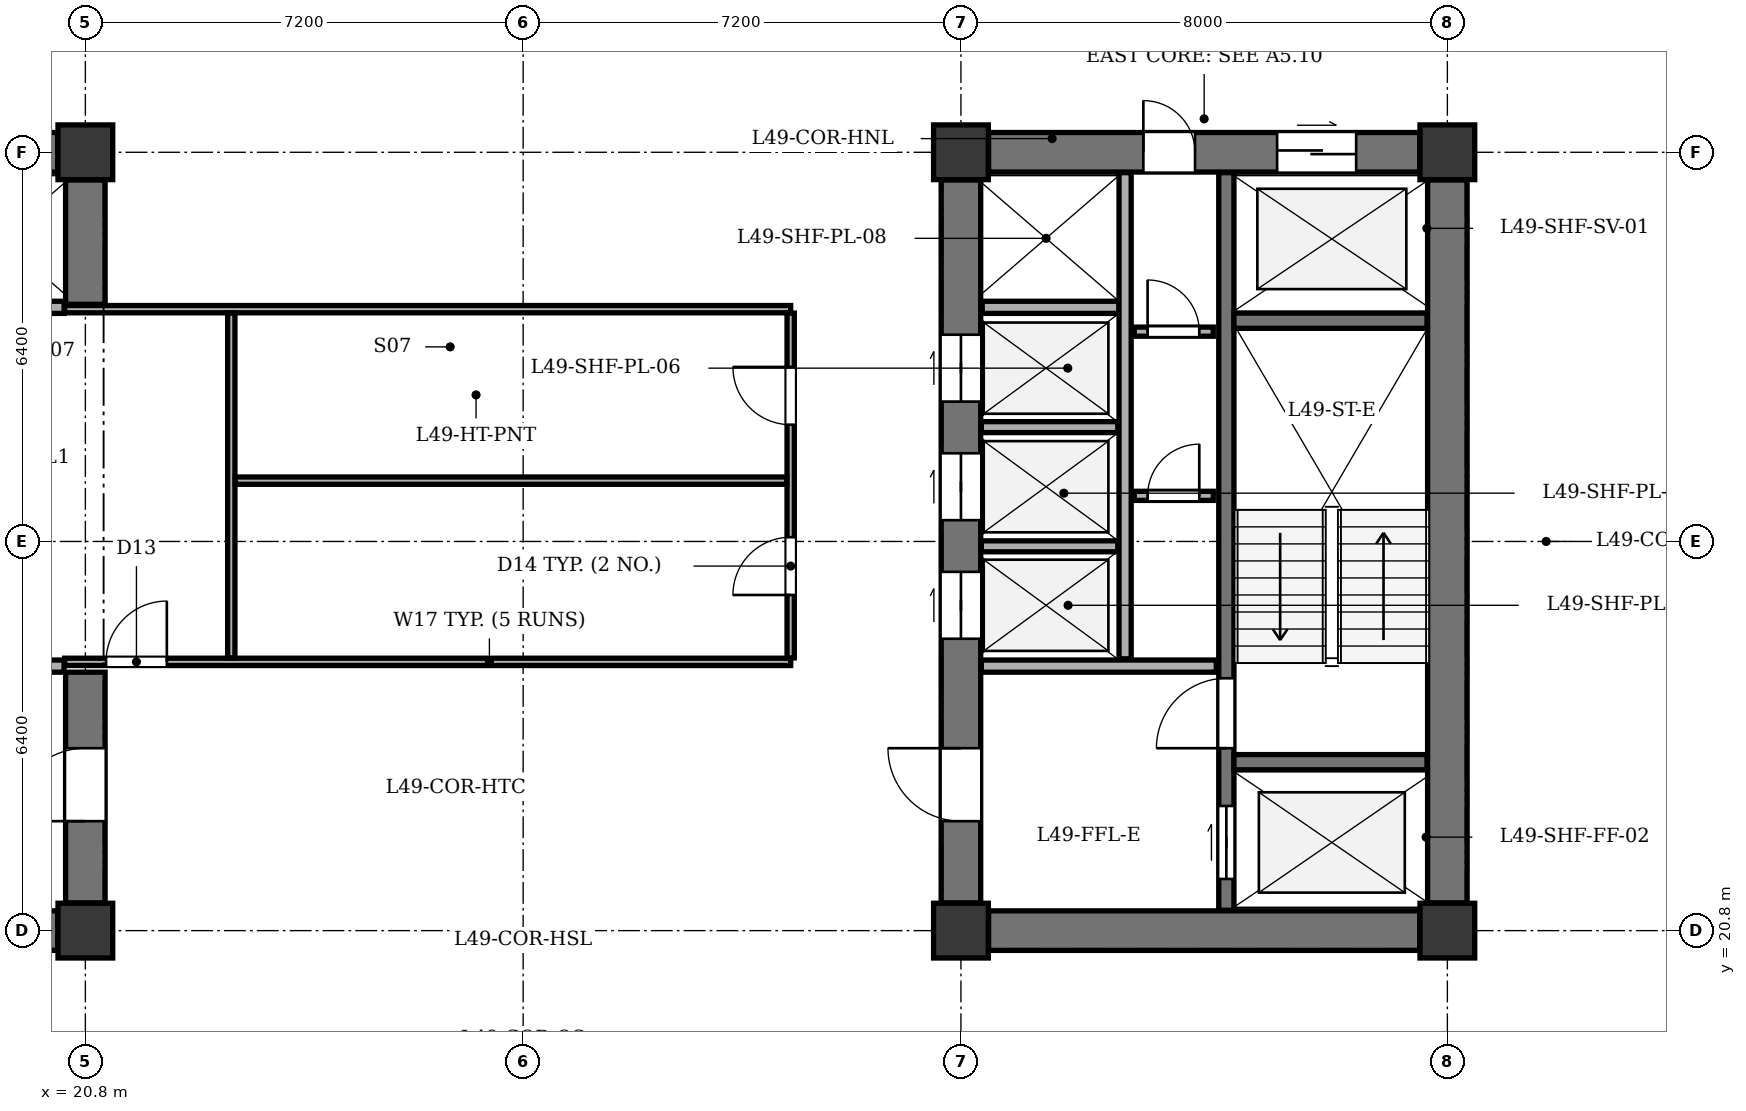
"""IFC4 building model, lengths in metres.
Left out: names, types, materials, properties, quantities, classifications, styles, units other than length and angle.
Written with IfcOpenShell. Run it as: python <this file> out.ifc"""

import sys

from ifc_helpers import new_model, si_unit, direction, frame, frame_2d, origin, origin_2d, place, context, subcontext, project, spatial, rectangle, extrude, element, fill, save


model = new_model("IFC4")
c1 = context("Model", 3, precision=1e-05, world=origin(), true_north=direction((0.0, 1.0)))
c2 = subcontext(c1, "Body", "Model", "MODEL_VIEW")
j1 = project(units=[si_unit("LENGTHUNIT", "METRE"), si_unit("PLANEANGLEUNIT", "RADIAN")], contexts=[c1])
p1 = place(None, origin())
s1 = spatial("IfcSite", under=j1, at=p1, CompositionType="ELEMENT")
p2 = place(p1, origin())
s2 = spatial("IfcBuilding", under=s1, at=p2, CompositionType="ELEMENT")
p3 = place(p2, frame((0.0, 0.0, 190.3)))
s3 = spatial("IfcBuildingStorey", under=s2, at=p3, CompositionType="ELEMENT", Elevation=190.3)
for number, where, z_axis, x_axis in (
    (1, (20.8, 20.8, 0.0), (0.0, 0.0, 1.0), (1.0, 0.0, 0.0)),
    (2, (20.8, 33.6, 0.0), (0.0, 0.0, 1.0), (1.0, 0.0, 0.0)),
    (3, (35.2, 20.8, 0.0), (0.0, 0.0, 1.0), (1.0, 0.0, 0.0)),
    (4, (43.2, 20.8, 0.0), (0.0, 0.0, 1.0), (1.0, 0.0, 0.0)),
    (5, (35.2, 33.6, 0.0), (0.0, 0.0, 1.0), (1.0, 0.0, 0.0)),
    (6, (43.2, 33.6, 0.0), (0.0, 0.0, 1.0), (1.0, 0.0, 0.0)),
):
    element("IfcColumn", number, at=place(p3, frame(where, z_axis=z_axis, x_axis=x_axis)), inside=s3, PredefinedType="COLUMN", context=c2, shape_type="SweptSolid", body=[
        extrude(rectangle(XDim=0.9, YDim=0.9, at=origin_2d()), origin(), (0.0, 0.0, 1.0), 3.5),
    ])
p4 = place(p3, frame((13.255, 20.8, 0.0), z_axis=(0.0, 0.0, 1.0), x_axis=(1.0, 0.0, 0.0)))
e7 = element("IfcWall", 7, at=p4, inside=s3, PredefinedType="SHEAR", context=c2, shape_type="SweptSolid", body=[
    extrude(rectangle(XDim=7.09, YDim=0.65, at=frame_2d((3.545, 0.0))), origin(), (0.0, 0.0, 1.0), 3.2),
])
p5 = place(p3, frame((13.255, 33.6, 0.0), z_axis=(0.0, 0.0, 1.0), x_axis=(1.0, 0.0, 0.0)))
e8 = element("IfcWall", 8, at=p5, inside=s3, PredefinedType="SHEAR", context=c2, shape_type="SweptSolid", body=[
    extrude(rectangle(XDim=7.09, YDim=0.65, at=frame_2d((3.545, 0.0))), origin(), (0.0, 0.0, 1.0), 3.2),
])
p6 = place(p5, frame((0.445, 0.0, 0.0)))
e9 = element("IfcOpeningElement", 9, at=p6, cuts=e8, PredefinedType="OPENING", context=c2, shape_type="SweptSolid", body=[
    extrude(rectangle(XDim=0.85, YDim=2.02, at=frame_2d((0.425, 1.01))), frame((0.0, 0.335, 0.0), z_axis=(0.0, -1.0, 0.0), x_axis=(1.0, 0.0, 0.0)), (0.0, 0.0, 1.0), 0.67),
])
p7 = place(p5, frame((1.745, 0.0, 0.0)))
e10 = element("IfcOpeningElement", 10, at=p7, cuts=e8, PredefinedType="OPENING", context=c2, shape_type="SweptSolid", body=[
    extrude(rectangle(XDim=0.85, YDim=2.02, at=frame_2d((0.425, 1.01))), frame((0.0, 0.335, 0.0), z_axis=(0.0, -1.0, 0.0), x_axis=(1.0, 0.0, 0.0)), (0.0, 0.0, 1.0), 0.67),
])
p8 = place(p3, frame((20.8, 21.255, 0.0), z_axis=(0.0, 0.0, 1.0), x_axis=(0.0, 1.0, 0.0)))
e11 = element("IfcWall", 11, at=p8, inside=s3, PredefinedType="SHEAR", context=c2, shape_type="SweptSolid", body=[
    extrude(rectangle(XDim=3.795, YDim=0.65, at=frame_2d((1.897, 0.0))), origin(), (0.0, 0.0, 1.0), 3.2),
])
p9 = place(p8, frame((1.345, 0.0, 0.0)))
e12 = element("IfcOpeningElement", 12, at=p9, cuts=e11, PredefinedType="OPENING", context=c2, shape_type="SweptSolid", body=[
    extrude(rectangle(XDim=1.2, YDim=2.15, at=frame_2d((0.6, 1.075))), frame((0.0, 0.335, 0.0), z_axis=(0.0, -1.0, 0.0), x_axis=(1.0, 0.0, 0.0)), (0.0, 0.0, 1.0), 0.67),
])
p10 = place(p3, frame((20.8, 31.1, 0.0), z_axis=(0.0, 0.0, 1.0), x_axis=(0.0, 1.0, 0.0)))
e13 = element("IfcWall", 13, at=p10, inside=s3, PredefinedType="SHEAR", context=c2, shape_type="SweptSolid", body=[
    extrude(rectangle(XDim=2.045, YDim=0.65, at=frame_2d((1.022, 0.0))), origin(), (0.0, 0.0, 1.0), 3.2),
])
for number, where, z_axis, x_axis in (
    (14, (16.6, 25.15, 0.0), (0.0, 0.0, 1.0), (1.0, 0.0, 0.0)),
    (15, (16.6, 31.05, 0.0), (0.0, 0.0, 1.0), (1.0, 0.0, 0.0)),
):
    element("IfcWall", number, at=place(p3, frame(where, z_axis=z_axis, x_axis=x_axis)), inside=s3, PredefinedType="SOLIDWALL", context=c2, shape_type="SweptSolid", body=[
        extrude(rectangle(XDim=3.85, YDim=0.2, at=frame_2d((1.925, 0.0))), origin(), (0.0, 0.0, 1.0), 3.2),
    ])
p11 = place(p3, frame((43.2, 21.255, 0.0), z_axis=(0.0, 0.0, 1.0), x_axis=(0.0, 1.0, 0.0)))
e16 = element("IfcWall", 16, at=p11, inside=s3, PredefinedType="SHEAR", context=c2, shape_type="SweptSolid", body=[
    extrude(rectangle(XDim=11.89, YDim=0.65, at=frame_2d((5.945, 0.0))), origin(), (0.0, 0.0, 1.0), 3.2),
])
p12 = place(p3, frame((35.655, 20.8, 0.0), z_axis=(0.0, 0.0, 1.0), x_axis=(1.0, 0.0, 0.0)))
e17 = element("IfcWall", 17, at=p12, inside=s3, PredefinedType="SHEAR", context=c2, shape_type="SweptSolid", body=[
    extrude(rectangle(XDim=7.09, YDim=0.65, at=frame_2d((3.545, 0.0))), origin(), (0.0, 0.0, 1.0), 3.2),
])
p13 = place(p3, frame((35.655, 33.6, 0.0), z_axis=(0.0, 0.0, 1.0), x_axis=(1.0, 0.0, 0.0)))
e18 = element("IfcWall", 18, at=p13, inside=s3, PredefinedType="SHEAR", context=c2, shape_type="SweptSolid", body=[
    extrude(rectangle(XDim=7.09, YDim=0.65, at=frame_2d((3.545, 0.0))), origin(), (0.0, 0.0, 1.0), 3.2),
])
p14 = place(p13, frame((4.745, 0.0, 0.0)))
e19 = element("IfcOpeningElement", 19, at=p14, cuts=e18, PredefinedType="OPENING", context=c2, shape_type="SweptSolid", body=[
    extrude(rectangle(XDim=1.3, YDim=2.15, at=frame_2d((0.65, 1.075))), frame((0.0, 0.335, 0.0), z_axis=(0.0, -1.0, 0.0), x_axis=(1.0, 0.0, 0.0)), (0.0, 0.0, 1.0), 0.67),
])
p15 = place(p13, frame((2.545, 0.0, 0.0)))
e20 = element("IfcOpeningElement", 20, at=p15, cuts=e18, PredefinedType="OPENING", context=c2, shape_type="SweptSolid", body=[
    extrude(rectangle(XDim=0.85, YDim=2.02, at=frame_2d((0.425, 1.01))), frame((0.0, 0.335, 0.0), z_axis=(0.0, -1.0, 0.0), x_axis=(1.0, 0.0, 0.0)), (0.0, 0.0, 1.0), 0.67),
])
p16 = place(p3, frame((35.2, 21.255, 0.0), z_axis=(0.0, 0.0, 1.0), x_axis=(0.0, 1.0, 0.0)))
e21 = element("IfcWall", 21, at=p16, inside=s3, PredefinedType="SHEAR", context=c2, shape_type="SweptSolid", body=[
    extrude(rectangle(XDim=11.89, YDim=0.65, at=frame_2d((5.945, 0.0))), origin(), (0.0, 0.0, 1.0), 3.2),
])
p17 = place(p16, frame((1.345, 0.0, 0.0)))
e22 = element("IfcOpeningElement", 22, at=p17, cuts=e21, PredefinedType="OPENING", context=c2, shape_type="SweptSolid", body=[
    extrude(rectangle(XDim=1.2, YDim=2.15, at=frame_2d((0.6, 1.075))), frame((0.0, 0.335, 0.0), z_axis=(0.0, -1.0, 0.0), x_axis=(1.0, 0.0, 0.0)), (0.0, 0.0, 1.0), 0.67),
])
p18 = place(p16, frame((4.345, 0.0, 0.0)))
e23 = element("IfcOpeningElement", 23, at=p18, cuts=e21, PredefinedType="OPENING", context=c2, shape_type="SweptSolid", body=[
    extrude(rectangle(XDim=1.1, YDim=2.1, at=frame_2d((0.55, 1.05))), frame((0.0, 0.335, 0.0), z_axis=(0.0, -1.0, 0.0), x_axis=(1.0, 0.0, 0.0)), (0.0, 0.0, 1.0), 0.67),
])
p19 = place(p16, frame((6.295, 0.0, 0.0)))
e24 = element("IfcOpeningElement", 24, at=p19, cuts=e21, PredefinedType="OPENING", context=c2, shape_type="SweptSolid", body=[
    extrude(rectangle(XDim=1.1, YDim=2.1, at=frame_2d((0.55, 1.05))), frame((0.0, 0.335, 0.0), z_axis=(0.0, -1.0, 0.0), x_axis=(1.0, 0.0, 0.0)), (0.0, 0.0, 1.0), 0.67),
])
p20 = place(p16, frame((8.245, 0.0, 0.0)))
e25 = element("IfcOpeningElement", 25, at=p20, cuts=e21, PredefinedType="OPENING", context=c2, shape_type="SweptSolid", body=[
    extrude(rectangle(XDim=1.1, YDim=2.1, at=frame_2d((0.55, 1.05))), frame((0.0, 0.335, 0.0), z_axis=(0.0, -1.0, 0.0), x_axis=(1.0, 0.0, 0.0)), (0.0, 0.0, 1.0), 0.67),
])
p21 = place(p3, frame((39.565, 21.135, 0.0), z_axis=(0.0, 0.0, 1.0), x_axis=(0.0, 1.0, 0.0)))
e26 = element("IfcWall", 26, at=p21, inside=s3, PredefinedType="SHEAR", context=c2, shape_type="SweptSolid", body=[
    extrude(rectangle(XDim=12.13, YDim=0.25, at=frame_2d((6.065, 0.0))), origin(), (0.0, 0.0, 1.0), 3.2),
])
p22 = place(p21, frame((0.515, 0.0, 0.0)))
e27 = element("IfcOpeningElement", 27, at=p22, cuts=e26, PredefinedType="OPENING", context=c2, shape_type="SweptSolid", body=[
    extrude(rectangle(XDim=1.2, YDim=2.15, at=frame_2d((0.6, 1.075))), frame((0.0, 0.135, 0.0), z_axis=(0.0, -1.0, 0.0), x_axis=(1.0, 0.0, 0.0)), (0.0, 0.0, 1.0), 0.27),
])
p23 = place(p21, frame((2.665, 0.0, 0.0)))
e28 = element("IfcOpeningElement", 28, at=p23, cuts=e26, PredefinedType="OPENING", context=c2, shape_type="SweptSolid", body=[
    extrude(rectangle(XDim=1.15, YDim=2.15, at=frame_2d((0.575, 1.075))), frame((0.0, 0.135, 0.0), z_axis=(0.0, -1.0, 0.0), x_axis=(1.0, 0.0, 0.0)), (0.0, 0.0, 1.0), 0.27),
])
for number, where, z_axis, x_axis in (
    (29, (39.69, 23.57, 0.0), (0.0, 0.0, 1.0), (1.0, 0.0, 0.0)),
    (30, (39.69, 30.83, 0.0), (0.0, 0.0, 1.0), (1.0, 0.0, 0.0)),
):
    element("IfcWall", number, at=place(p3, frame(where, z_axis=z_axis, x_axis=x_axis)), inside=s3, PredefinedType="SHEAR", context=c2, shape_type="SweptSolid", body=[
        extrude(rectangle(XDim=3.175, YDim=0.25, at=frame_2d((1.587, 0.0))), origin(), (0.0, 0.0, 1.0), 3.2),
    ])
p24 = place(p3, frame((35.535, 25.15, 0.0), z_axis=(0.0, 0.0, 1.0), x_axis=(1.0, 0.0, 0.0)))
e31 = element("IfcWall", 31, at=p24, inside=s3, PredefinedType="SOLIDWALL", context=c2, shape_type="SweptSolid", body=[
    extrude(rectangle(XDim=3.865, YDim=0.2, at=frame_2d((1.933, 0.0))), origin(), (0.0, 0.0, 1.0), 3.2),
])
p25 = place(p3, frame((35.55, 31.05, 0.0), z_axis=(0.0, 0.0, 1.0), x_axis=(1.0, 0.0, 0.0)))
e32 = element("IfcWall", 32, at=p25, inside=s3, PredefinedType="SOLIDWALL", context=c2, shape_type="SweptSolid", body=[
    extrude(rectangle(XDim=2.25, YDim=0.2, at=frame_2d((1.125, 0.0))), origin(), (0.0, 0.0, 1.0), 3.2),
])
p26 = place(p3, frame((37.9, 25.27, 0.0), z_axis=(0.0, 0.0, 1.0), x_axis=(0.0, 1.0, 0.0)))
e33 = element("IfcWall", 33, at=p26, inside=s3, PredefinedType="SOLIDWALL", context=c2, shape_type="SweptSolid", body=[
    extrude(rectangle(XDim=7.995, YDim=0.2, at=frame_2d((3.998, 0.0))), origin(), (0.0, 0.0, 1.0), 3.2),
])
for number, where, z_axis, x_axis in (
    (34, (35.535, 27.12, 0.0), (0.0, 0.0, 1.0), (1.0, 0.0, 0.0)),
    (35, (35.535, 29.08, 0.0), (0.0, 0.0, 1.0), (1.0, 0.0, 0.0)),
):
    element("IfcWall", number, at=place(p3, frame(where, z_axis=z_axis, x_axis=x_axis)), inside=s3, PredefinedType="PARTITIONING", context=c2, shape_type="SweptSolid", body=[
        extrude(rectangle(XDim=2.245, YDim=0.18, at=frame_2d((1.123, 0.0))), origin(), (0.0, 0.0, 1.0), 3.2),
    ])
p27 = place(p3, frame((38.05, 27.95, 0.0), z_axis=(0.0, 0.0, 1.0), x_axis=(1.0, 0.0, 0.0)))
e36 = element("IfcWall", 36, at=p27, inside=s3, PredefinedType="PARTITIONING", context=c2, shape_type="SweptSolid", body=[
    extrude(rectangle(XDim=1.3, YDim=0.15, at=frame_2d((0.65, 0.0))), origin(), (0.0, 0.0, 1.0), 3.2),
])
p28 = place(p27, frame((0.22, 0.0, 0.0)))
e37 = element("IfcOpeningElement", 37, at=p28, cuts=e36, PredefinedType="OPENING", context=c2, shape_type="SweptSolid", body=[
    extrude(rectangle(XDim=0.85, YDim=2.02, at=frame_2d((0.425, 1.01))), frame((0.0, 0.085, 0.0), z_axis=(0.0, -1.0, 0.0), x_axis=(1.0, 0.0, 0.0)), (0.0, 0.0, 1.0), 0.17),
])
p29 = place(p3, frame((38.05, 30.65, 0.0), z_axis=(0.0, 0.0, 1.0), x_axis=(1.0, 0.0, 0.0)))
e38 = element("IfcWall", 38, at=p29, inside=s3, PredefinedType="PARTITIONING", context=c2, shape_type="SweptSolid", body=[
    extrude(rectangle(XDim=1.3, YDim=0.15, at=frame_2d((0.65, 0.0))), origin(), (0.0, 0.0, 1.0), 3.2),
])
p30 = place(p29, frame((0.22, 0.0, 0.0)))
e39 = element("IfcOpeningElement", 39, at=p30, cuts=e38, PredefinedType="OPENING", context=c2, shape_type="SweptSolid", body=[
    extrude(rectangle(XDim=0.85, YDim=2.02, at=frame_2d((0.425, 1.01))), frame((0.0, 0.085, 0.0), z_axis=(0.0, -1.0, 0.0), x_axis=(1.0, 0.0, 0.0)), (0.0, 0.0, 1.0), 0.17),
])
p31 = place(p3, frame((20.46, 25.22, 0.0), z_axis=(0.0, 0.0, 1.0), x_axis=(1.0, 0.0, 0.0)))
e40 = element("IfcWall", 40, at=p31, inside=s3, PredefinedType="PARTITIONING", context=c2, shape_type="SweptSolid", body=[
    extrude(rectangle(XDim=11.94, YDim=0.12, at=frame_2d((5.97, 0.0))), origin(), (0.0, 0.0, 1.0), 3.2),
])
p32 = place(p31, frame((0.68, 0.0, 0.0)))
e41 = element("IfcOpeningElement", 41, at=p32, cuts=e40, PredefinedType="OPENING", context=c2, shape_type="SweptSolid", body=[
    extrude(rectangle(XDim=1.0, YDim=2.1, at=frame_2d((0.5, 1.05))), frame((0.0, 0.07, 0.0), z_axis=(0.0, -1.0, 0.0), x_axis=(1.0, 0.0, 0.0)), (0.0, 0.0, 1.0), 0.14),
])
p33 = place(p3, frame((20.46, 31.02, 0.0), z_axis=(0.0, 0.0, 1.0), x_axis=(1.0, 0.0, 0.0)))
e42 = element("IfcWall", 42, at=p33, inside=s3, PredefinedType="PARTITIONING", context=c2, shape_type="SweptSolid", body=[
    extrude(rectangle(XDim=11.94, YDim=0.12, at=frame_2d((5.97, 0.0))), origin(), (0.0, 0.0, 1.0), 3.2),
])
p34 = place(p3, frame((32.4, 25.285, 0.0), z_axis=(0.0, 0.0, 1.0), x_axis=(0.0, 1.0, 0.0)))
e43 = element("IfcWall", 43, at=p34, inside=s3, PredefinedType="PARTITIONING", context=c2, shape_type="SweptSolid", body=[
    extrude(rectangle(XDim=5.67, YDim=0.12, at=frame_2d((2.835, 0.0))), origin(), (0.0, 0.0, 1.0), 3.2),
])
p35 = place(p34, frame((1.035, 0.0, 0.0)))
e44 = element("IfcOpeningElement", 44, at=p35, cuts=e43, PredefinedType="OPENING", context=c2, shape_type="SweptSolid", body=[
    extrude(rectangle(XDim=0.95, YDim=2.1, at=frame_2d((0.475, 1.05))), frame((0.0, 0.07, 0.0), z_axis=(0.0, -1.0, 0.0), x_axis=(1.0, 0.0, 0.0)), (0.0, 0.0, 1.0), 0.14),
])
p36 = place(p34, frame((3.835, 0.0, 0.0)))
e45 = element("IfcOpeningElement", 45, at=p36, cuts=e43, PredefinedType="OPENING", context=c2, shape_type="SweptSolid", body=[
    extrude(rectangle(XDim=0.95, YDim=2.1, at=frame_2d((0.475, 1.05))), frame((0.0, 0.07, 0.0), z_axis=(0.0, -1.0, 0.0), x_axis=(1.0, 0.0, 0.0)), (0.0, 0.0, 1.0), 0.14),
])
p37 = place(p3, frame((23.2, 25.285, 0.0), z_axis=(0.0, 0.0, 1.0), x_axis=(0.0, 1.0, 0.0)))
e46 = element("IfcWall", 46, at=p37, inside=s3, PredefinedType="PARTITIONING", context=c2, shape_type="SweptSolid", body=[
    extrude(rectangle(XDim=5.67, YDim=0.12, at=frame_2d((2.835, 0.0))), origin(), (0.0, 0.0, 1.0), 3.2),
])
p38 = place(p3, frame((23.265, 28.2, 0.0), z_axis=(0.0, 0.0, 1.0), x_axis=(1.0, 0.0, 0.0)))
e47 = element("IfcWall", 47, at=p38, inside=s3, PredefinedType="PARTITIONING", context=c2, shape_type="SweptSolid", body=[
    extrude(rectangle(XDim=9.07, YDim=0.12, at=frame_2d((4.535, 0.0))), origin(), (0.0, 0.0, 1.0), 3.2),
])
p39 = place(p9, origin())
e48 = element("IfcDoor", 48, at=p39, inside=s3, OperationType="SINGLE_SWING_LEFT", PredefinedType="DOOR", context=c2, shape_type="SweptSolid", body=[
    extrude(rectangle(XDim=1.2, YDim=2.15, at=frame_2d((0.6, 1.075))), frame((0.0, 0.025, 0.0), z_axis=(0.0, -1.0, 0.0), x_axis=(1.0, 0.0, 0.0)), (0.0, 0.0, 1.0), 0.05),
])
fill(e12, e48)
p40 = place(p14, origin())
e49 = element("IfcDoor", 49, at=p40, inside=s3, OperationType="DOUBLE_DOOR_SLIDING", PredefinedType="DOOR", context=c2, shape_type="SweptSolid", body=[
    extrude(rectangle(XDim=1.3, YDim=2.15, at=frame_2d((0.65, 1.075))), frame((0.0, 0.025, 0.0), z_axis=(0.0, -1.0, 0.0), x_axis=(1.0, 0.0, 0.0)), (0.0, 0.0, 1.0), 0.05),
])
fill(e19, e49)
p41 = place(p15, origin())
e50 = element("IfcDoor", 50, at=p41, inside=s3, OperationType="SINGLE_SWING_LEFT", PredefinedType="DOOR", context=c2, shape_type="SweptSolid", body=[
    extrude(rectangle(XDim=0.85, YDim=2.02, at=frame_2d((0.425, 1.01))), frame((0.0, 0.025, 0.0), z_axis=(0.0, -1.0, 0.0), x_axis=(1.0, 0.0, 0.0)), (0.0, 0.0, 1.0), 0.05),
])
fill(e20, e50)
p42 = place(p17, origin())
e51 = element("IfcDoor", 51, at=p42, inside=s3, OperationType="SINGLE_SWING_RIGHT", PredefinedType="DOOR", context=c2, shape_type="SweptSolid", body=[
    extrude(rectangle(XDim=1.2, YDim=2.15, at=frame_2d((0.6, 1.075))), frame((0.0, 0.025, 0.0), z_axis=(0.0, -1.0, 0.0), x_axis=(1.0, 0.0, 0.0)), (0.0, 0.0, 1.0), 0.05),
])
fill(e22, e51)
p43 = place(p18, origin())
e52 = element("IfcDoor", 52, at=p43, inside=s3, OperationType="DOUBLE_DOOR_SLIDING", PredefinedType="DOOR", context=c2, shape_type="SweptSolid", body=[
    extrude(rectangle(XDim=1.1, YDim=2.1, at=frame_2d((0.55, 1.05))), frame((0.0, 0.025, 0.0), z_axis=(0.0, -1.0, 0.0), x_axis=(1.0, 0.0, 0.0)), (0.0, 0.0, 1.0), 0.05),
])
fill(e23, e52)
p44 = place(p19, origin())
e53 = element("IfcDoor", 53, at=p44, inside=s3, OperationType="DOUBLE_DOOR_SLIDING", PredefinedType="DOOR", context=c2, shape_type="SweptSolid", body=[
    extrude(rectangle(XDim=1.1, YDim=2.1, at=frame_2d((0.55, 1.05))), frame((0.0, 0.025, 0.0), z_axis=(0.0, -1.0, 0.0), x_axis=(1.0, 0.0, 0.0)), (0.0, 0.0, 1.0), 0.05),
])
fill(e24, e53)
p45 = place(p20, origin())
e54 = element("IfcDoor", 54, at=p45, inside=s3, OperationType="DOUBLE_DOOR_SLIDING", PredefinedType="DOOR", context=c2, shape_type="SweptSolid", body=[
    extrude(rectangle(XDim=1.1, YDim=2.1, at=frame_2d((0.55, 1.05))), frame((0.0, 0.025, 0.0), z_axis=(0.0, -1.0, 0.0), x_axis=(1.0, 0.0, 0.0)), (0.0, 0.0, 1.0), 0.05),
])
fill(e25, e54)
p46 = place(p22, origin())
e55 = element("IfcDoor", 55, at=p46, inside=s3, OperationType="DOUBLE_DOOR_SLIDING", PredefinedType="DOOR", context=c2, shape_type="SweptSolid", body=[
    extrude(rectangle(XDim=1.2, YDim=2.15, at=frame_2d((0.6, 1.075))), frame((0.0, 0.025, 0.0), z_axis=(0.0, -1.0, 0.0), x_axis=(1.0, 0.0, 0.0)), (0.0, 0.0, 1.0), 0.05),
])
fill(e27, e55)
p47 = place(p23, origin())
e56 = element("IfcDoor", 56, at=p47, inside=s3, OperationType="SINGLE_SWING_LEFT", PredefinedType="DOOR", context=c2, shape_type="SweptSolid", body=[
    extrude(rectangle(XDim=1.15, YDim=2.15, at=frame_2d((0.575, 1.075))), frame((0.0, 0.025, 0.0), z_axis=(0.0, -1.0, 0.0), x_axis=(1.0, 0.0, 0.0)), (0.0, 0.0, 1.0), 0.05),
])
fill(e28, e56)
p48 = place(p28, origin())
e57 = element("IfcDoor", 57, at=p48, inside=s3, OperationType="SINGLE_SWING_RIGHT", PredefinedType="DOOR", context=c2, shape_type="SweptSolid", body=[
    extrude(rectangle(XDim=0.85, YDim=2.02, at=frame_2d((0.425, 1.01))), frame((0.0, 0.025, 0.0), z_axis=(0.0, -1.0, 0.0), x_axis=(1.0, 0.0, 0.0)), (0.0, 0.0, 1.0), 0.05),
])
fill(e37, e57)
p49 = place(p30, origin())
e58 = element("IfcDoor", 58, at=p49, inside=s3, OperationType="SINGLE_SWING_LEFT", PredefinedType="DOOR", context=c2, shape_type="SweptSolid", body=[
    extrude(rectangle(XDim=0.85, YDim=2.02, at=frame_2d((0.425, 1.01))), frame((0.0, 0.025, 0.0), z_axis=(0.0, -1.0, 0.0), x_axis=(1.0, 0.0, 0.0)), (0.0, 0.0, 1.0), 0.05),
])
fill(e39, e58)
p50 = place(p32, origin())
e59 = element("IfcDoor", 59, at=p50, inside=s3, OperationType="SINGLE_SWING_RIGHT", PredefinedType="DOOR", context=c2, shape_type="SweptSolid", body=[
    extrude(rectangle(XDim=1.0, YDim=2.1, at=frame_2d((0.5, 1.05))), frame((0.0, 0.025, 0.0), z_axis=(0.0, -1.0, 0.0), x_axis=(1.0, 0.0, 0.0)), (0.0, 0.0, 1.0), 0.05),
])
fill(e41, e59)
p51 = place(p35, origin())
e60 = element("IfcDoor", 60, at=p51, inside=s3, OperationType="SINGLE_SWING_LEFT", PredefinedType="DOOR", context=c2, shape_type="SweptSolid", body=[
    extrude(rectangle(XDim=0.95, YDim=2.1, at=frame_2d((0.475, 1.05))), frame((0.0, 0.025, 0.0), z_axis=(0.0, -1.0, 0.0), x_axis=(1.0, 0.0, 0.0)), (0.0, 0.0, 1.0), 0.05),
])
fill(e44, e60)
p52 = place(p36, origin())
e61 = element("IfcDoor", 61, at=p52, inside=s3, OperationType="SINGLE_SWING_RIGHT", PredefinedType="DOOR", context=c2, shape_type="SweptSolid", body=[
    extrude(rectangle(XDim=0.95, YDim=2.1, at=frame_2d((0.475, 1.05))), frame((0.0, 0.025, 0.0), z_axis=(0.0, -1.0, 0.0), x_axis=(1.0, 0.0, 0.0)), (0.0, 0.0, 1.0), 0.05),
])
fill(e45, e61)
save(model, sys.argv[1])
